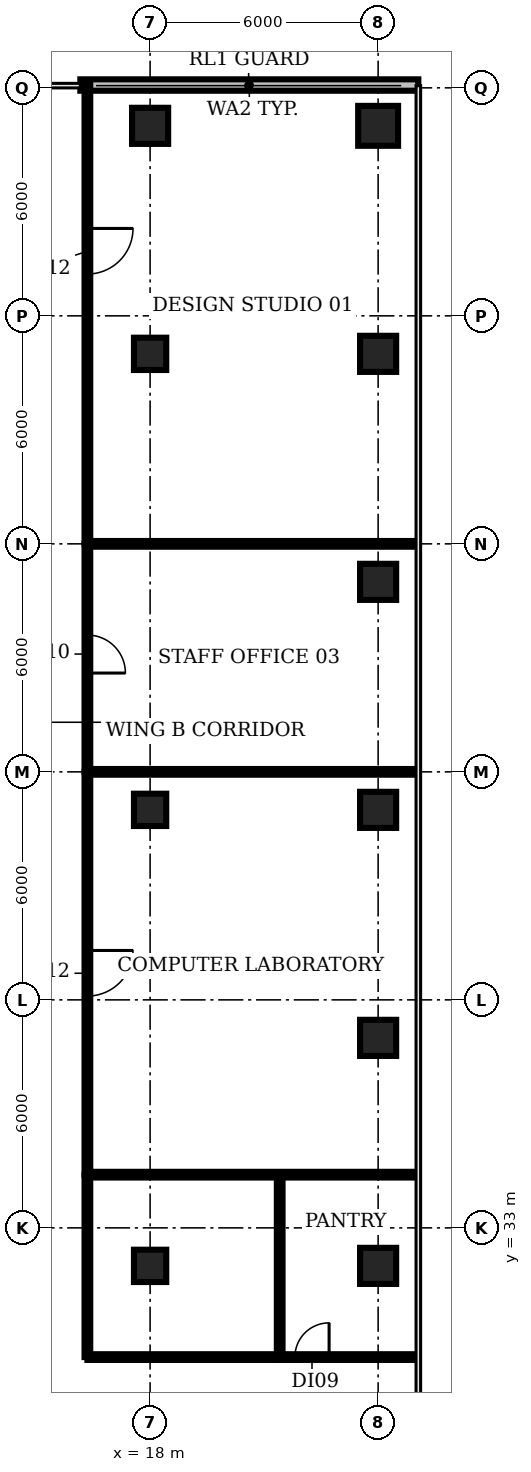
"""IFC4 building model, lengths in metres.
Left out: names, types, materials, properties, quantities, classifications, styles, units other than length and angle.
Written with IfcOpenShell. Run it as: python <this file> out.ifc"""

import sys

from ifc_helpers import new_model, si_unit, direction, frame, frame_2d, origin, origin_2d, place, context, subcontext, project, spatial, rectangle, circle, extrude, element, fill, save


model = new_model("IFC4")
c1 = context("Model", 3, precision=1e-05, world=origin(), true_north=direction((0.0, 1.0)))
c2 = subcontext(c1, "Body", "Model", "MODEL_VIEW")
j1 = project(units=[si_unit("LENGTHUNIT", "METRE"), si_unit("PLANEANGLEUNIT", "RADIAN")], contexts=[c1])
p1 = place(None, origin())
s1 = spatial("IfcSite", under=j1, at=p1, CompositionType="ELEMENT")
p2 = place(p1, origin())
s2 = spatial("IfcBuilding", under=s1, at=p2, CompositionType="ELEMENT")
p3 = place(p2, frame((0.0, 0.0, 62.6)))
s3 = spatial("IfcBuildingStorey", under=s2, at=p3, CompositionType="ELEMENT", Elevation=62.6)
for number, where, z_axis, x_axis in (
    (1, (18.0, 32.0, 0.0), (0.0, 0.0, 1.0), (1.0, 0.0, 0.0)),
    (2, (18.0, 44.0, 0.0), (0.0, 0.0, 1.0), (1.0, 0.0, 0.0)),
    (3, (18.0, 56.0, 0.0), (0.0, 0.0, 1.0), (1.0, 0.0, 0.0)),
):
    element("IfcColumn", number, at=place(p3, frame(where, z_axis=z_axis, x_axis=x_axis)), inside=s3, PredefinedType="COLUMN", context=c2, shape_type="SweptSolid", body=[
        extrude(rectangle(XDim=0.85, YDim=0.85, at=origin_2d()), origin(), (0.0, 0.0, 1.0), 3.85),
    ])
for number, where, z_axis, x_axis in (
    (4, (18.0, 62.0, 0.0), (0.0, 0.0, 1.0), (1.0, 0.0, 0.0)),
    (5, (24.0, 32.0, 0.0), (0.0, 0.0, 1.0), (1.0, 0.0, 0.0)),
    (6, (24.0, 38.0, 0.0), (0.0, 0.0, 1.0), (1.0, 0.0, 0.0)),
    (7, (24.0, 44.0, 0.0), (0.0, 0.0, 1.0), (1.0, 0.0, 0.0)),
    (8, (24.0, 50.0, 0.0), (0.0, 0.0, 1.0), (1.0, 0.0, 0.0)),
    (9, (24.0, 56.0, 0.0), (0.0, 0.0, 1.0), (1.0, 0.0, 0.0)),
):
    element("IfcColumn", number, at=place(p3, frame(where, z_axis=z_axis, x_axis=x_axis)), inside=s3, PredefinedType="COLUMN", context=c2, shape_type="SweptSolid", body=[
        extrude(rectangle(XDim=0.95, YDim=0.95, at=origin_2d()), origin(), (0.0, 0.0, 1.0), 3.85),
    ])
p4 = place(p3, frame((24.0, 62.0, 0.0), z_axis=(0.0, 0.0, 1.0), x_axis=(1.0, 0.0, 0.0)))
e10 = element("IfcColumn", 10, at=p4, inside=s3, PredefinedType="COLUMN", context=c2, shape_type="SweptSolid", body=[
    extrude(circle(Radius=0.525, at=origin_2d()), origin(), (0.0, 0.0, 1.0), 3.85),
])
p5 = place(p3, frame((25.058, 63.074, 0.0), z_axis=(0.0, 0.0, 1.0), x_axis=(-1.0, 0.0, 0.0)))
e11 = element("IfcWall", 11, at=p5, inside=s3, PredefinedType="SOLIDWALL", context=c2, shape_type="SweptSolid", body=[
    extrude(rectangle(XDim=8.894, YDim=0.3, at=frame_2d((4.447, 0.0))), origin(), (0.0, 0.0, 1.0), 3.85),
])
p6 = place(p3, frame((16.35, 29.6, 0.0), z_axis=(0.0, 0.0, 1.0), x_axis=(0.0, 1.0, 0.0)))
e12 = element("IfcWall", 12, at=p6, inside=s3, PredefinedType="PARTITIONING", context=c2, shape_type="SweptSolid", body=[
    extrude(rectangle(XDim=4.8, YDim=0.15, at=frame_2d((2.4, 0.0))), origin(), (0.0, 0.0, 1.0), 2.83),
])
p7 = place(p3, frame((16.35, 29.6, 0.0), z_axis=(0.0, 0.0, 1.0), x_axis=(1.0, 0.0, 0.0)))
e13 = element("IfcWall", 13, at=p7, inside=s3, PredefinedType="PARTITIONING", context=c2, shape_type="SweptSolid", body=[
    extrude(rectangle(XDim=5.06, YDim=0.15, at=frame_2d((2.53, 0.0))), origin(), (0.0, 0.0, 1.0), 2.83),
])
p8 = place(p3, frame((16.35, 34.4, 0.0), z_axis=(0.0, 0.0, 1.0), x_axis=(1.0, 0.0, 0.0)))
e14 = element("IfcWall", 14, at=p8, inside=s3, PredefinedType="PARTITIONING", context=c2, shape_type="SweptSolid", body=[
    extrude(rectangle(XDim=8.66, YDim=0.15, at=frame_2d((4.33, 0.0))), origin(), (0.0, 0.0, 1.0), 2.83),
])
p9 = place(p3, frame((16.35, 45.0, 0.0), z_axis=(0.0, 0.0, 1.0), x_axis=(0.0, -1.0, 0.0)))
e15 = element("IfcWall", 15, at=p9, inside=s3, PredefinedType="PARTITIONING", context=c2, shape_type="SweptSolid", body=[
    extrude(rectangle(XDim=10.6, YDim=0.15, at=frame_2d((5.3, 0.0))), origin(), (0.0, 0.0, 1.0), 2.83),
])
p10 = place(p9, frame((4.7, 0.0, 0.0)))
e16 = element("IfcOpeningElement", 16, at=p10, cuts=e15, PredefinedType="OPENING", context=c2, shape_type="SweptSolid", body=[
    extrude(rectangle(XDim=1.2, YDim=2.1, at=frame_2d((0.6, 1.05))), frame((0.0, 0.085, 0.0), z_axis=(0.0, -1.0, 0.0), x_axis=(1.0, 0.0, 0.0)), (0.0, 0.0, 1.0), 0.17),
])
p11 = place(p3, frame((16.35, 45.0, 0.0), z_axis=(0.0, 0.0, 1.0), x_axis=(1.0, 0.0, 0.0)))
e17 = element("IfcWall", 17, at=p11, inside=s3, PredefinedType="PARTITIONING", context=c2, shape_type="SweptSolid", body=[
    extrude(rectangle(XDim=8.66, YDim=0.15, at=frame_2d((4.33, 0.0))), origin(), (0.0, 0.0, 1.0), 2.83),
])
p12 = place(p3, frame((16.35, 51.0, 0.0), z_axis=(0.0, 0.0, 1.0), x_axis=(0.0, -1.0, 0.0)))
e18 = element("IfcWall", 18, at=p12, inside=s3, PredefinedType="PARTITIONING", context=c2, shape_type="SweptSolid", body=[
    extrude(rectangle(XDim=6.0, YDim=0.15, at=frame_2d((3.0, 0.0))), origin(), (0.0, 0.0, 1.0), 2.83),
])
p13 = place(p12, frame((2.4, 0.0, 0.0)))
e19 = element("IfcOpeningElement", 19, at=p13, cuts=e18, PredefinedType="OPENING", context=c2, shape_type="SweptSolid", body=[
    extrude(rectangle(XDim=1.0, YDim=2.1, at=frame_2d((0.5, 1.05))), frame((0.0, 0.085, 0.0), z_axis=(0.0, -1.0, 0.0), x_axis=(1.0, 0.0, 0.0)), (0.0, 0.0, 1.0), 0.17),
])
p14 = place(p3, frame((16.35, 51.0, 0.0), z_axis=(0.0, 0.0, 1.0), x_axis=(1.0, 0.0, 0.0)))
e20 = element("IfcWall", 20, at=p14, inside=s3, PredefinedType="PARTITIONING", context=c2, shape_type="SweptSolid", body=[
    extrude(rectangle(XDim=8.66, YDim=0.15, at=frame_2d((4.33, 0.0))), origin(), (0.0, 0.0, 1.0), 2.83),
])
p15 = place(p3, frame((16.35, 63.118, 0.0), z_axis=(0.0, 0.0, 1.0), x_axis=(0.0, -1.0, 0.0)))
e21 = element("IfcWall", 21, at=p15, inside=s3, PredefinedType="PARTITIONING", context=c2, shape_type="SweptSolid", body=[
    extrude(rectangle(XDim=12.118, YDim=0.15, at=frame_2d((6.059, 0.0))), origin(), (0.0, 0.0, 1.0), 2.83),
])
p16 = place(p15, frame((3.818, 0.0, 0.0)))
e22 = element("IfcOpeningElement", 22, at=p16, cuts=e21, PredefinedType="OPENING", context=c2, shape_type="SweptSolid", body=[
    extrude(rectangle(XDim=1.2, YDim=2.1, at=frame_2d((0.6, 1.05))), frame((0.0, 0.085, 0.0), z_axis=(0.0, -1.0, 0.0), x_axis=(1.0, 0.0, 0.0)), (0.0, 0.0, 1.0), 0.17),
])
p17 = place(p3, frame((21.41, 29.6, 0.0), z_axis=(0.0, 0.0, 1.0), x_axis=(0.0, 1.0, 0.0)))
e23 = element("IfcWall", 23, at=p17, inside=s3, PredefinedType="PARTITIONING", context=c2, shape_type="SweptSolid", body=[
    extrude(rectangle(XDim=4.8, YDim=0.15, at=frame_2d((2.4, 0.0))), origin(), (0.0, 0.0, 1.0), 2.83),
])
p18 = place(p3, frame((21.41, 29.6, 0.0), z_axis=(0.0, 0.0, 1.0), x_axis=(1.0, 0.0, 0.0)))
e24 = element("IfcWall", 24, at=p18, inside=s3, PredefinedType="PARTITIONING", context=c2, shape_type="SweptSolid", body=[
    extrude(rectangle(XDim=3.6, YDim=0.15, at=frame_2d((1.8, 0.0))), origin(), (0.0, 0.0, 1.0), 2.83),
])
p19 = place(p18, frame((0.4, 0.0, 0.0)))
e25 = element("IfcOpeningElement", 25, at=p19, cuts=e24, PredefinedType="OPENING", context=c2, shape_type="SweptSolid", body=[
    extrude(rectangle(XDim=0.9, YDim=2.1, at=frame_2d((0.45, 1.05))), frame((0.0, 0.085, 0.0), z_axis=(0.0, -1.0, 0.0), x_axis=(1.0, 0.0, 0.0)), (0.0, 0.0, 1.0), 0.17),
])
p20 = place(p10, origin())
e26 = element("IfcDoor", 26, at=p20, inside=s3, OperationType="SINGLE_SWING_LEFT", PredefinedType="DOOR", context=c2, shape_type="SweptSolid", body=[
    extrude(rectangle(XDim=1.2, YDim=2.1, at=frame_2d((0.6, 1.05))), frame((0.0, 0.025, 0.0), z_axis=(0.0, -1.0, 0.0), x_axis=(1.0, 0.0, 0.0)), (0.0, 0.0, 1.0), 0.05),
])
fill(e16, e26)
p21 = place(p13, origin())
e27 = element("IfcDoor", 27, at=p21, inside=s3, OperationType="SINGLE_SWING_RIGHT", PredefinedType="DOOR", context=c2, shape_type="SweptSolid", body=[
    extrude(rectangle(XDim=1.0, YDim=2.1, at=frame_2d((0.5, 1.05))), frame((0.0, 0.025, 0.0), z_axis=(0.0, -1.0, 0.0), x_axis=(1.0, 0.0, 0.0)), (0.0, 0.0, 1.0), 0.05),
])
fill(e19, e27)
p22 = place(p16, origin())
e28 = element("IfcDoor", 28, at=p22, inside=s3, OperationType="SINGLE_SWING_LEFT", PredefinedType="DOOR", context=c2, shape_type="SweptSolid", body=[
    extrude(rectangle(XDim=1.2, YDim=2.1, at=frame_2d((0.6, 1.05))), frame((0.0, 0.025, 0.0), z_axis=(0.0, -1.0, 0.0), x_axis=(1.0, 0.0, 0.0)), (0.0, 0.0, 1.0), 0.05),
])
fill(e22, e28)
p23 = place(p19, origin())
e29 = element("IfcDoor", 29, at=p23, inside=s3, OperationType="SINGLE_SWING_RIGHT", PredefinedType="DOOR", context=c2, shape_type="SweptSolid", body=[
    extrude(rectangle(XDim=0.9, YDim=2.1, at=frame_2d((0.45, 1.05))), frame((0.0, 0.025, 0.0), z_axis=(0.0, -1.0, 0.0), x_axis=(1.0, 0.0, 0.0)), (0.0, 0.0, 1.0), 0.05),
])
fill(e25, e29)
save(model, sys.argv[1])
